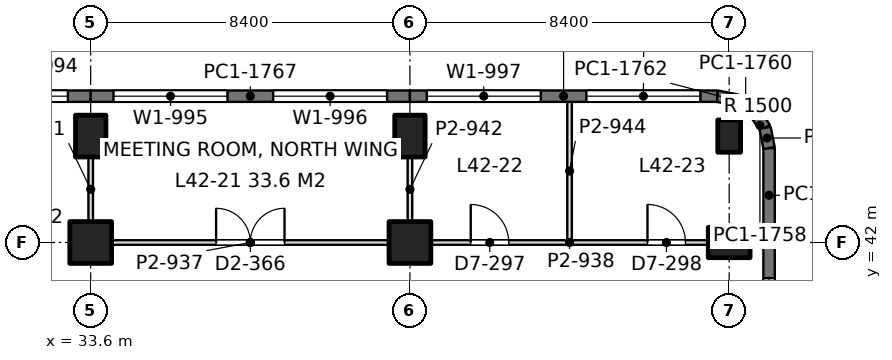
"""IFC4 building model, lengths in metres.
Left out: names, types, materials, properties, quantities, classifications, styles, units other than length and angle.
Written with IfcOpenShell. Run it as: python <this file> out.ifc"""

import sys

from ifc_helpers import new_model, si_unit, direction, frame, frame_2d, origin, origin_2d, place, context, subcontext, project, spatial, rectangle, extrude, element, fill, save


model = new_model("IFC4")
c1 = context("Model", 3, precision=1e-05, world=origin(), true_north=direction((0.0, 1.0)))
c2 = subcontext(c1, "Body", "Model", "MODEL_VIEW")
j1 = project(units=[si_unit("LENGTHUNIT", "METRE"), si_unit("PLANEANGLEUNIT", "RADIAN")], contexts=[c1])
p1 = place(None, origin())
s1 = spatial("IfcSite", under=j1, at=p1, CompositionType="ELEMENT")
p2 = place(p1, origin())
s2 = spatial("IfcBuilding", under=s1, at=p2, CompositionType="ELEMENT")
p3 = place(p2, frame((0.0, 0.0, 186.0)))
s3 = spatial("IfcBuildingStorey", under=s2, at=p3, CompositionType="ELEMENT", Elevation=186.0)
p4 = place(p3, frame((33.6, 42.0, 0.0), z_axis=(0.0, 0.0, 1.0), x_axis=(1.0, 0.0, 0.0)))
e1 = element("IfcColumn", 1, at=p4, inside=s3, PredefinedType="COLUMN", context=c2, shape_type="SweptSolid", body=[
    extrude(rectangle(XDim=1.1, YDim=1.1, at=origin_2d()), origin(), (0.0, 0.0, 1.0), 4.2),
])
p5 = place(p3, frame((33.6, 44.8, 0.0), z_axis=(0.0, 0.0, 1.0), x_axis=(1.0, 0.0, 0.0)))
e2 = element("IfcColumn", 2, at=p5, inside=s3, PredefinedType="COLUMN", context=c2, shape_type="SweptSolid", body=[
    extrude(rectangle(XDim=0.8, YDim=1.1, at=origin_2d()), origin(), (0.0, 0.0, 1.0), 4.2),
])
p6 = place(p3, frame((42.0, 42.0, 0.0), z_axis=(0.0, 0.0, 1.0), x_axis=(1.0, 0.0, 0.0)))
e3 = element("IfcColumn", 3, at=p6, inside=s3, PredefinedType="COLUMN", context=c2, shape_type="SweptSolid", body=[
    extrude(rectangle(XDim=1.1, YDim=1.1, at=origin_2d()), origin(), (0.0, 0.0, 1.0), 4.2),
])
for number, where, z_axis, x_axis in (
    (4, (42.0, 44.8, 0.0), (0.0, 0.0, 1.0), (1.0, 0.0, 0.0)),
    (5, (50.4, 42.0, 0.0), (0.0, 0.0, 1.0), (0.0, 1.0, 0.0)),
):
    element("IfcColumn", number, at=place(p3, frame(where, z_axis=z_axis, x_axis=x_axis)), inside=s3, PredefinedType="COLUMN", context=c2, shape_type="SweptSolid", body=[
        extrude(rectangle(XDim=0.8, YDim=1.1, at=origin_2d()), origin(), (0.0, 0.0, 1.0), 4.2),
    ])
p7 = place(p3, frame((50.4, 44.8, 0.0), z_axis=(0.0, 0.0, 1.0), x_axis=(1.0, 0.0, 0.0)))
e6 = element("IfcColumn", 6, at=p7, inside=s3, PredefinedType="COLUMN", context=c2, shape_type="SweptSolid", body=[
    extrude(rectangle(XDim=0.6, YDim=0.85, at=origin_2d()), origin(), (0.0, 0.0, 1.0), 4.2),
])
p8 = place(p3, frame((25.2, 45.85, 0.0), z_axis=(0.0, 0.0, 1.0), x_axis=(1.0, 0.0, 0.0)))
e7 = element("IfcWall", 7, at=p8, inside=s3, PredefinedType="SOLIDWALL", context=c2, shape_type="SweptSolid", body=[
    extrude(rectangle(XDim=8.4, YDim=0.3, at=frame_2d((4.2, 0.0))), origin(), (0.0, 0.0, 1.0), 4.05),
])
p9 = place(p8, frame((0.6, 0.0, 0.9)))
e8 = element("IfcOpeningElement", 8, at=p9, cuts=e7, PredefinedType="OPENING", context=c2, shape_type="SweptSolid", body=[
    extrude(rectangle(XDim=3.0, YDim=1.9, at=frame_2d((1.5, 0.95))), frame((0.0, 0.16, 0.0), z_axis=(0.0, -1.0, 0.0), x_axis=(1.0, 0.0, 0.0)), (0.0, 0.0, 1.0), 0.32),
])
p10 = place(p8, frame((4.8, 0.0, 0.9)))
e9 = element("IfcOpeningElement", 9, at=p10, cuts=e7, PredefinedType="OPENING", context=c2, shape_type="SweptSolid", body=[
    extrude(rectangle(XDim=3.0, YDim=1.9, at=frame_2d((1.5, 0.95))), frame((0.0, 0.16, 0.0), z_axis=(0.0, -1.0, 0.0), x_axis=(1.0, 0.0, 0.0)), (0.0, 0.0, 1.0), 0.32),
])
p11 = place(p3, frame((33.6, 45.85, 0.0), z_axis=(0.0, 0.0, 1.0), x_axis=(1.0, 0.0, 0.0)))
e10 = element("IfcWall", 10, at=p11, inside=s3, PredefinedType="SOLIDWALL", context=c2, shape_type="SweptSolid", body=[
    extrude(rectangle(XDim=8.4, YDim=0.3, at=frame_2d((4.2, 0.0))), origin(), (0.0, 0.0, 1.0), 4.05),
])
p12 = place(p11, frame((0.6, 0.0, 0.9)))
e11 = element("IfcOpeningElement", 11, at=p12, cuts=e10, PredefinedType="OPENING", context=c2, shape_type="SweptSolid", body=[
    extrude(rectangle(XDim=3.0, YDim=1.9, at=frame_2d((1.5, 0.95))), frame((0.0, 0.16, 0.0), z_axis=(0.0, -1.0, 0.0), x_axis=(1.0, 0.0, 0.0)), (0.0, 0.0, 1.0), 0.32),
])
p13 = place(p11, frame((4.8, 0.0, 0.9)))
e12 = element("IfcOpeningElement", 12, at=p13, cuts=e10, PredefinedType="OPENING", context=c2, shape_type="SweptSolid", body=[
    extrude(rectangle(XDim=3.0, YDim=1.9, at=frame_2d((1.5, 0.95))), frame((0.0, 0.16, 0.0), z_axis=(0.0, -1.0, 0.0), x_axis=(1.0, 0.0, 0.0)), (0.0, 0.0, 1.0), 0.32),
])
p14 = place(p3, frame((42.0, 45.85, 0.0), z_axis=(0.0, 0.0, 1.0), x_axis=(1.0, 0.0, 0.0)))
e13 = element("IfcWall", 13, at=p14, inside=s3, PredefinedType="SOLIDWALL", context=c2, shape_type="SweptSolid", body=[
    extrude(rectangle(XDim=8.085, YDim=0.3, at=frame_2d((4.042, 0.0))), origin(), (0.0, 0.0, 1.0), 4.05),
])
p15 = place(p14, frame((0.443, 0.0, 0.9)))
e14 = element("IfcOpeningElement", 14, at=p15, cuts=e13, PredefinedType="OPENING", context=c2, shape_type="SweptSolid", body=[
    extrude(rectangle(XDim=3.0, YDim=1.9, at=frame_2d((1.5, 0.95))), frame((0.0, 0.16, 0.0), z_axis=(0.0, -1.0, 0.0), x_axis=(1.0, 0.0, 0.0)), (0.0, 0.0, 1.0), 0.32),
])
p16 = place(p14, frame((4.643, 0.0, 0.9)))
e15 = element("IfcOpeningElement", 15, at=p16, cuts=e13, PredefinedType="OPENING", context=c2, shape_type="SweptSolid", body=[
    extrude(rectangle(XDim=3.0, YDim=1.9, at=frame_2d((1.5, 0.95))), frame((0.0, 0.16, 0.0), z_axis=(0.0, -1.0, 0.0), x_axis=(1.0, 0.0, 0.0)), (0.0, 0.0, 1.0), 0.32),
])
p17 = place(p3, frame((50.085, 45.85, 0.0), z_axis=(0.0, 0.0, 1.0), x_axis=(0.980702050465, -0.1955082817, 0.0)))
e16 = element("IfcWall", 16, at=p17, inside=s3, PredefinedType="SOLIDWALL", context=c2, shape_type="SweptSolid", body=[
    extrude(rectangle(XDim=0.541, YDim=0.3, at=frame_2d((0.271, 0.0))), origin(), (0.0, 0.0, 1.0), 4.05),
])
p18 = place(p3, frame((50.615, 45.744, 0.0), z_axis=(0.0, 0.0, 1.0), x_axis=(0.831692711774, -0.555236195849, 0.0)))
e17 = element("IfcWall", 17, at=p18, inside=s3, PredefinedType="SOLIDWALL", context=c2, shape_type="SweptSolid", body=[
    extrude(rectangle(XDim=0.525, YDim=0.3, at=frame_2d((0.263, 0.0))), origin(), (0.0, 0.0, 1.0), 4.05),
])
p19 = place(p3, frame((51.052, 45.453, 0.0), z_axis=(0.0, 0.0, 1.0), x_axis=(0.55534295404, -0.831621430339, 0.0)))
e18 = element("IfcWall", 18, at=p19, inside=s3, PredefinedType="SOLIDWALL", context=c2, shape_type="SweptSolid", body=[
    extrude(rectangle(XDim=0.526, YDim=0.3, at=frame_2d((0.263, 0.0))), origin(), (0.0, 0.0, 1.0), 4.05),
])
p20 = place(p3, frame((51.344, 45.015, 0.0), z_axis=(0.0, 0.0, 1.0), x_axis=(0.195073962632, -0.980788534345, 0.0)))
e19 = element("IfcWall", 19, at=p20, inside=s3, PredefinedType="SOLIDWALL", context=c2, shape_type="SweptSolid", body=[
    extrude(rectangle(XDim=0.541, YDim=0.3, at=frame_2d((0.271, 0.0))), origin(), (0.0, 0.0, 1.0), 4.05),
])
p21 = place(p3, frame((51.45, 44.485, 0.0), z_axis=(0.0, 0.0, 1.0), x_axis=(0.0, -1.0, 0.0)))
e20 = element("IfcWall", 20, at=p21, inside=s3, PredefinedType="SOLIDWALL", context=c2, shape_type="SweptSolid", body=[
    extrude(rectangle(XDim=2.485, YDim=0.3, at=frame_2d((1.243, 0.0))), origin(), (0.0, 0.0, 1.0), 4.05),
])
p22 = place(p3, frame((51.45, 42.0, 0.0), z_axis=(0.0, 0.0, 1.0), x_axis=(0.0, -1.0, 0.0)))
e21 = element("IfcWall", 21, at=p22, inside=s3, PredefinedType="SOLIDWALL", context=c2, shape_type="SweptSolid", body=[
    extrude(rectangle(XDim=4.275, YDim=0.3, at=frame_2d((2.137, 0.0))), origin(), (0.0, 0.0, 1.0), 4.05),
])
p23 = place(p22, frame((0.938, 0.0, 0.9)))
e22 = element("IfcOpeningElement", 22, at=p23, cuts=e21, PredefinedType="OPENING", context=c2, shape_type="SweptSolid", body=[
    extrude(rectangle(XDim=2.4, YDim=1.9, at=frame_2d((1.2, 0.95))), frame((0.0, 0.16, 0.0), z_axis=(0.0, -1.0, 0.0), x_axis=(1.0, 0.0, 0.0)), (0.0, 0.0, 1.0), 0.32),
])
p24 = place(p3, frame((34.149, 42.0, 0.0), z_axis=(0.0, 0.0, 1.0), x_axis=(1.0, 0.0, 0.0)))
e23 = element("IfcWall", 23, at=p24, inside=s3, PredefinedType="PARTITIONING", context=c2, shape_type="SweptSolid", body=[
    extrude(rectangle(XDim=7.302, YDim=0.12, at=frame_2d((3.651, 0.0))), origin(), (0.0, 0.0, 1.0), 3.55),
])
p25 = place(p24, frame((2.751, 0.0, 0.0)))
e24 = element("IfcOpeningElement", 24, at=p25, cuts=e23, PredefinedType="OPENING", context=c2, shape_type="SweptSolid", body=[
    extrude(rectangle(XDim=1.8, YDim=2.2, at=frame_2d((0.9, 1.1))), frame((0.0, 0.07, 0.0), z_axis=(0.0, -1.0, 0.0), x_axis=(1.0, 0.0, 0.0)), (0.0, 0.0, 1.0), 0.14),
])
p26 = place(p3, frame((42.549, 42.0, 0.0), z_axis=(0.0, 0.0, 1.0), x_axis=(1.0, 0.0, 0.0)))
e25 = element("IfcWall", 25, at=p26, inside=s3, PredefinedType="PARTITIONING", context=c2, shape_type="SweptSolid", body=[
    extrude(rectangle(XDim=7.302, YDim=0.12, at=frame_2d((3.651, 0.0))), origin(), (0.0, 0.0, 1.0), 3.55),
])
p27 = place(p26, frame((1.051, 0.0, 0.0)))
e26 = element("IfcOpeningElement", 26, at=p27, cuts=e25, PredefinedType="OPENING", context=c2, shape_type="SweptSolid", body=[
    extrude(rectangle(XDim=1.0, YDim=2.4, at=frame_2d((0.5, 1.2))), frame((0.0, 0.07, 0.0), z_axis=(0.0, -1.0, 0.0), x_axis=(1.0, 0.0, 0.0)), (0.0, 0.0, 1.0), 0.14),
])
p28 = place(p26, frame((5.701, 0.0, 0.0)))
e27 = element("IfcOpeningElement", 27, at=p28, cuts=e25, PredefinedType="OPENING", context=c2, shape_type="SweptSolid", body=[
    extrude(rectangle(XDim=1.0, YDim=2.4, at=frame_2d((0.5, 1.2))), frame((0.0, 0.07, 0.0), z_axis=(0.0, -1.0, 0.0), x_axis=(1.0, 0.0, 0.0)), (0.0, 0.0, 1.0), 0.14),
])
for number, where, z_axis, x_axis in (
    (28, (33.6, 42.549, 0.0), (0.0, 0.0, 1.0), (0.0, 1.0, 0.0)),
    (29, (42.0, 42.549, 0.0), (0.0, 0.0, 1.0), (0.0, 1.0, 0.0)),
):
    element("IfcWall", number, at=place(p3, frame(where, z_axis=z_axis, x_axis=x_axis)), inside=s3, PredefinedType="PARTITIONING", context=c2, shape_type="SweptSolid", body=[
        extrude(rectangle(XDim=1.702, YDim=0.12, at=frame_2d((0.851, 0.0))), origin(), (0.0, 0.0, 1.0), 3.69),
    ])
p29 = place(p3, frame((46.2, 42.058, 0.0), z_axis=(0.0, 0.0, 1.0), x_axis=(0.0, 1.0, 0.0)))
e30 = element("IfcWall", 30, at=p29, inside=s3, PredefinedType="PARTITIONING", context=c2, shape_type="SweptSolid", body=[
    extrude(rectangle(XDim=3.644, YDim=0.12, at=frame_2d((1.822, 0.0))), origin(), (0.0, 0.0, 1.0), 3.55),
])
p30 = place(p10, origin())
e31 = element("IfcWindow", 31, at=p30, inside=s3, PartitioningType="SINGLE_PANEL", PredefinedType="WINDOW", context=c2, shape_type="SweptSolid", body=[
    extrude(rectangle(XDim=3.0, YDim=1.9, at=frame_2d((1.5, 0.95))), frame((0.0, 0.03, 0.0), z_axis=(0.0, -1.0, 0.0), x_axis=(1.0, 0.0, 0.0)), (0.0, 0.0, 1.0), 0.06),
])
fill(e9, e31)
p31 = place(p12, origin())
e32 = element("IfcWindow", 32, at=p31, inside=s3, PartitioningType="SINGLE_PANEL", PredefinedType="WINDOW", context=c2, shape_type="SweptSolid", body=[
    extrude(rectangle(XDim=3.0, YDim=1.9, at=frame_2d((1.5, 0.95))), frame((0.0, 0.03, 0.0), z_axis=(0.0, -1.0, 0.0), x_axis=(1.0, 0.0, 0.0)), (0.0, 0.0, 1.0), 0.06),
])
fill(e11, e32)
p32 = place(p13, origin())
e33 = element("IfcWindow", 33, at=p32, inside=s3, PartitioningType="SINGLE_PANEL", PredefinedType="WINDOW", context=c2, shape_type="SweptSolid", body=[
    extrude(rectangle(XDim=3.0, YDim=1.9, at=frame_2d((1.5, 0.95))), frame((0.0, 0.03, 0.0), z_axis=(0.0, -1.0, 0.0), x_axis=(1.0, 0.0, 0.0)), (0.0, 0.0, 1.0), 0.06),
])
fill(e12, e33)
p33 = place(p15, origin())
e34 = element("IfcWindow", 34, at=p33, inside=s3, PartitioningType="SINGLE_PANEL", PredefinedType="WINDOW", context=c2, shape_type="SweptSolid", body=[
    extrude(rectangle(XDim=3.0, YDim=1.9, at=frame_2d((1.5, 0.95))), frame((0.0, 0.03, 0.0), z_axis=(0.0, -1.0, 0.0), x_axis=(1.0, 0.0, 0.0)), (0.0, 0.0, 1.0), 0.06),
])
fill(e14, e34)
p34 = place(p16, origin())
e35 = element("IfcWindow", 35, at=p34, inside=s3, PartitioningType="SINGLE_PANEL", PredefinedType="WINDOW", context=c2, shape_type="SweptSolid", body=[
    extrude(rectangle(XDim=3.0, YDim=1.9, at=frame_2d((1.5, 0.95))), frame((0.0, 0.03, 0.0), z_axis=(0.0, -1.0, 0.0), x_axis=(1.0, 0.0, 0.0)), (0.0, 0.0, 1.0), 0.06),
])
fill(e15, e35)
p35 = place(p23, origin())
e36 = element("IfcWindow", 36, at=p35, inside=s3, PartitioningType="SINGLE_PANEL", PredefinedType="WINDOW", context=c2, shape_type="SweptSolid", body=[
    extrude(rectangle(XDim=2.4, YDim=1.9, at=frame_2d((1.2, 0.95))), frame((0.0, 0.03, 0.0), z_axis=(0.0, -1.0, 0.0), x_axis=(1.0, 0.0, 0.0)), (0.0, 0.0, 1.0), 0.06),
])
fill(e22, e36)
p36 = place(p25, origin())
e37 = element("IfcDoor", 37, at=p36, inside=s3, OperationType="DOUBLE_DOOR_SINGLE_SWING", PredefinedType="DOOR", context=c2, shape_type="SweptSolid", body=[
    extrude(rectangle(XDim=1.8, YDim=2.2, at=frame_2d((0.9, 1.1))), frame((0.0, 0.025, 0.0), z_axis=(0.0, -1.0, 0.0), x_axis=(1.0, 0.0, 0.0)), (0.0, 0.0, 1.0), 0.05),
])
fill(e24, e37)
p37 = place(p27, origin())
e38 = element("IfcDoor", 38, at=p37, inside=s3, OperationType="SINGLE_SWING_LEFT", PredefinedType="DOOR", context=c2, shape_type="SweptSolid", body=[
    extrude(rectangle(XDim=1.0, YDim=2.4, at=frame_2d((0.5, 1.2))), frame((0.0, 0.025, 0.0), z_axis=(0.0, -1.0, 0.0), x_axis=(1.0, 0.0, 0.0)), (0.0, 0.0, 1.0), 0.05),
])
fill(e26, e38)
p38 = place(p28, origin())
e39 = element("IfcDoor", 39, at=p38, inside=s3, OperationType="SINGLE_SWING_LEFT", PredefinedType="DOOR", context=c2, shape_type="SweptSolid", body=[
    extrude(rectangle(XDim=1.0, YDim=2.4, at=frame_2d((0.5, 1.2))), frame((0.0, 0.025, 0.0), z_axis=(0.0, -1.0, 0.0), x_axis=(1.0, 0.0, 0.0)), (0.0, 0.0, 1.0), 0.05),
])
fill(e27, e39)
save(model, sys.argv[1])
